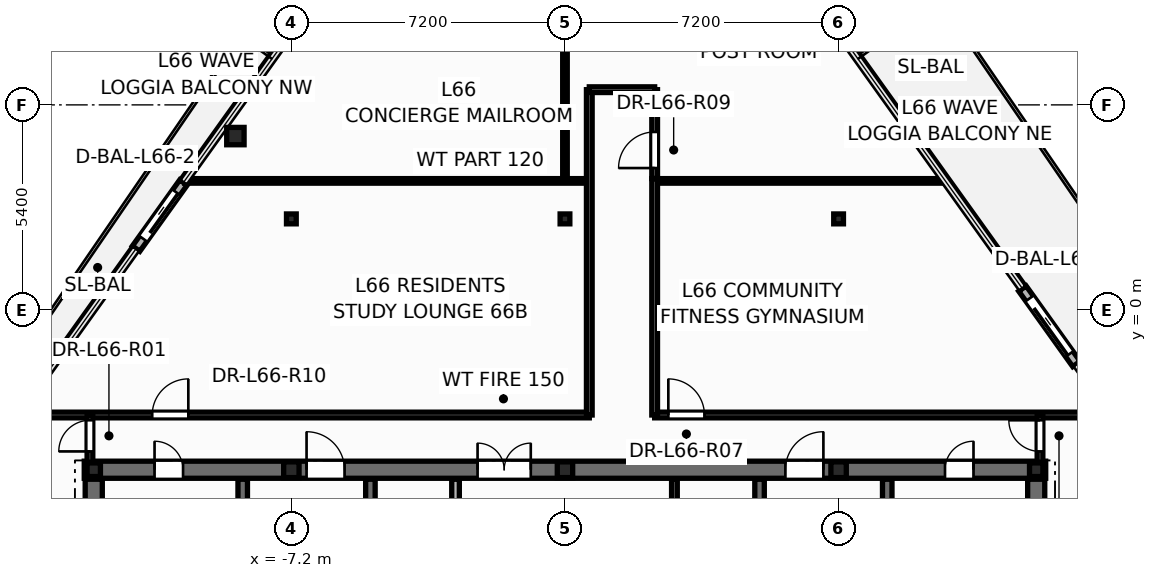
"""IFC4 building model, lengths in metres.
Left out: names, types, materials, properties, quantities, classifications, styles, units other than length and angle.
Written with IfcOpenShell. Run it as: python <this file> out.ifc"""

import sys

from ifc_helpers import new_model, si_unit, direction, frame, frame_2d, origin, origin_2d, place, context, subcontext, project, spatial, rectangle, hollow_circle, i_section, extrude, element, fill, save


model = new_model("IFC4")
c1 = context("Model", 3, precision=1e-05, world=origin(), true_north=direction((0.0, 1.0)))
c2 = subcontext(c1, "Body", "Model", "MODEL_VIEW")
j1 = project(units=[si_unit("LENGTHUNIT", "METRE"), si_unit("PLANEANGLEUNIT", "RADIAN")], contexts=[c1])
p1 = place(None, origin())
s1 = spatial("IfcSite", under=j1, at=p1, CompositionType="ELEMENT")
p2 = place(p1, origin())
s2 = spatial("IfcBuilding", under=s1, at=p2, CompositionType="ELEMENT")
p3 = place(p2, frame((0.0, 0.0, 252.6)))
s3 = spatial("IfcBuildingStorey", under=s2, at=p3, CompositionType="ELEMENT", Elevation=252.6)
for number, where, z_axis, x_axis in (
    (1, (8.673, 4.579, 0.0), (0.0, 0.0, 1.0), (1.0, 0.0, 0.0)),
    (2, (-8.673, 4.579, 0.0), (0.0, 0.0, 1.0), (1.0, 0.0, 0.0)),
):
    element("IfcColumn", number, at=place(p3, frame(where, z_axis=z_axis, x_axis=x_axis)), inside=s3, PredefinedType="COLUMN", context=c2, shape_type="SweptSolid", body=[
        extrude(hollow_circle(Radius=0.229, WallThickness=0.016, at=origin_2d()), origin(), (0.0, 0.0, 1.0), 3.6),
    ])
for number, where, z_axis, x_axis in (
    (3, (12.4, -4.2, 0.0), (0.0, 0.0, 1.0), (1.0, 0.0, 0.0)),
    (4, (-12.4, -4.2, 0.0), (0.0, 0.0, 1.0), (1.0, 0.0, 0.0)),
):
    element("IfcColumn", number, at=place(p3, frame(where, z_axis=z_axis, x_axis=x_axis)), inside=s3, PredefinedType="COLUMN", context=c2, shape_type="SweptSolid", body=[
        extrude(i_section(OverallWidth=0.352, OverallDepth=0.359, WebThickness=0.018, FlangeThickness=0.026, at=origin_2d()), origin(), (0.0, 0.0, 1.0), 3.6),
    ])
for number, where, z_axis, x_axis in (
    (5, (-7.2, -4.2, 0.0), (0.0, 0.0, 1.0), (1.0, 0.0, 0.0)),
    (6, (0.0, -4.2, 0.0), (0.0, 0.0, 1.0), (1.0, 0.0, 0.0)),
    (7, (7.2, -4.2, 0.0), (0.0, 0.0, 1.0), (1.0, 0.0, 0.0)),
):
    element("IfcColumn", number, at=place(p3, frame(where, z_axis=z_axis, x_axis=x_axis)), inside=s3, PredefinedType="PILASTER", context=c2, shape_type="SweptSolid", body=[
        extrude(i_section(OverallWidth=0.405, OverallDepth=0.414, WebThickness=0.022, FlangeThickness=0.032, at=origin_2d()), origin(), (0.0, 0.0, 1.0), 3.6),
    ])
for number, where, z_axis, x_axis in (
    (8, (-7.2, 2.4, 0.0), (0.0, 0.0, 1.0), (1.0, 0.0, 0.0)),
    (9, (0.0, 2.4, 0.0), (0.0, 0.0, 1.0), (1.0, 0.0, 0.0)),
    (10, (7.2, 2.4, 0.0), (0.0, 0.0, 1.0), (1.0, 0.0, 0.0)),
):
    element("IfcColumn", number, at=place(p3, frame(where, z_axis=z_axis, x_axis=x_axis)), inside=s3, PredefinedType="COLUMN", context=c2, shape_type="SweptSolid", body=[
        extrude(i_section(OverallWidth=0.256, OverallDepth=0.26, WebThickness=0.01, FlangeThickness=0.017, at=origin_2d()), origin(), (0.0, 0.0, 1.0), 3.6),
    ])
p4 = place(p3, frame((13.458, -1.417, -0.015), z_axis=(0.0, 0.0, 1.0), x_axis=(-0.582146480264, 0.813083928949, 0.0)))
e11 = element("IfcWall", 11, at=p4, inside=s3, PredefinedType="STANDARD", context=c2, shape_type="SweptSolid", body=[
    extrude(rectangle(XDim=2.44, YDim=0.24, at=frame_2d((1.22, 0.0))), origin(), (0.0, 0.0, 1.0), 2.878),
])
p5 = place(p4, frame((0.32, 0.0, 0.015)))
e12 = element("IfcOpeningElement", 12, at=p5, cuts=e11, PredefinedType="OPENING", context=c2, shape_type="SweptSolid", body=[
    extrude(rectangle(XDim=1.806, YDim=2.204, at=frame_2d((0.9, 1.102))), frame((0.0, 0.13, 0.0), z_axis=(0.0, -1.0, 0.0), x_axis=(1.0, 0.0, 0.0)), (0.0, 0.0, 1.0), 0.26),
])
p6 = place(p3, frame((-10.039, 3.357, -0.015), z_axis=(0.0, 0.0, 1.0), x_axis=(-0.58216589686, -0.813070026832, 0.0)))
e13 = element("IfcWall", 13, at=p6, inside=s3, PredefinedType="STANDARD", context=c2, shape_type="SweptSolid", body=[
    extrude(rectangle(XDim=2.14, YDim=0.24, at=frame_2d((1.07, 0.0))), origin(), (0.0, 0.0, 1.0), 2.878),
])
p7 = place(p6, frame((0.32, 0.0, 0.015)))
e14 = element("IfcOpeningElement", 14, at=p7, cuts=e13, PredefinedType="OPENING", context=c2, shape_type="SweptSolid", body=[
    extrude(rectangle(XDim=1.506, YDim=2.204, at=frame_2d((0.75, 1.102))), frame((0.0, 0.13, 0.0), z_axis=(0.0, -1.0, 0.0), x_axis=(1.0, 0.0, 0.0)), (0.0, 0.0, 1.0), 0.26),
])
p8 = place(p3, frame((2.88, -5.6, 0.0), z_axis=(0.0, 0.0, 1.0), x_axis=(0.0, 1.0, 0.0)))
e15 = element("IfcWall", 15, at=p8, inside=s3, PredefinedType="PARTITIONING", context=c2, shape_type="SweptSolid", body=[
    extrude(rectangle(XDim=1.15, YDim=0.15, at=frame_2d((0.575, 0.0))), origin(), (0.0, 0.0, 1.0), 3.345),
])
p9 = place(p3, frame((-12.65, -4.2, 0.0), z_axis=(0.0, 0.0, 1.0), x_axis=(1.0, 0.0, 0.0)))
e16 = element("IfcWall", 16, at=p9, inside=s3, PredefinedType="SHEAR", context=c2, shape_type="SweptSolid", body=[
    extrude(rectangle(XDim=25.3, YDim=0.45, at=frame_2d((12.65, 0.0))), origin(), (0.0, 0.0, 1.0), 3.6),
])
p10 = place(p9, frame((1.85, 0.0, 0.0)))
e17 = element("IfcOpeningElement", 17, at=p10, cuts=e16, PredefinedType="OPENING", context=c2, shape_type="SweptSolid", body=[
    extrude(rectangle(XDim=0.756, YDim=2.054, at=frame_2d((0.375, 1.027))), frame((0.0, 0.235, 0.0), z_axis=(0.0, -1.0, 0.0), x_axis=(1.0, 0.0, 0.0)), (0.0, 0.0, 1.0), 0.47),
])
p11 = place(p9, frame((22.65, 0.0, 0.0)))
e18 = element("IfcOpeningElement", 18, at=p11, cuts=e16, PredefinedType="OPENING", context=c2, shape_type="SweptSolid", body=[
    extrude(rectangle(XDim=0.756, YDim=2.054, at=frame_2d((0.375, 1.027))), frame((0.0, 0.235, 0.0), z_axis=(0.0, -1.0, 0.0), x_axis=(1.0, 0.0, 0.0)), (0.0, 0.0, 1.0), 0.47),
])
p12 = place(p9, frame((5.85, 0.0, 0.0)))
e19 = element("IfcOpeningElement", 19, at=p12, cuts=e16, PredefinedType="OPENING", context=c2, shape_type="SweptSolid", body=[
    extrude(rectangle(XDim=1.006, YDim=2.104, at=frame_2d((0.5, 1.052))), frame((0.0, 0.235, 0.0), z_axis=(0.0, -1.0, 0.0), x_axis=(1.0, 0.0, 0.0)), (0.0, 0.0, 1.0), 0.47),
])
p13 = place(p9, frame((10.35, 0.0, 0.0)))
e20 = element("IfcOpeningElement", 20, at=p13, cuts=e16, PredefinedType="OPENING", context=c2, shape_type="SweptSolid", body=[
    extrude(rectangle(XDim=1.406, YDim=2.154, at=frame_2d((0.7, 1.077))), frame((0.0, 0.235, 0.0), z_axis=(0.0, -1.0, 0.0), x_axis=(1.0, 0.0, 0.0)), (0.0, 0.0, 1.0), 0.47),
])
p14 = place(p9, frame((18.45, 0.0, 0.0)))
e21 = element("IfcOpeningElement", 21, at=p14, cuts=e16, PredefinedType="OPENING", context=c2, shape_type="SweptSolid", body=[
    extrude(rectangle(XDim=1.006, YDim=2.104, at=frame_2d((0.5, 1.052))), frame((0.0, 0.235, 0.0), z_axis=(0.0, -1.0, 0.0), x_axis=(1.0, 0.0, 0.0)), (0.0, 0.0, 1.0), 0.47),
])
p15 = place(p3, frame((-8.48, -13.85, 0.0), z_axis=(0.0, 0.0, 1.0), x_axis=(0.0, 1.0, 0.0)))
e22 = element("IfcWall", 22, at=p15, inside=s3, PredefinedType="SHEAR", context=c2, shape_type="SweptSolid", body=[
    extrude(rectangle(XDim=9.4, YDim=0.25, at=frame_2d((4.7, 0.0))), origin(), (0.0, 0.0, 1.0), 3.6),
])
p16 = place(p15, frame((6.95, 0.0, 0.0)))
e23 = element("IfcOpeningElement", 23, at=p16, cuts=e22, PredefinedType="OPENING", context=c2, shape_type="SweptSolid", body=[
    extrude(rectangle(XDim=1.006, YDim=2.104, at=frame_2d((0.5, 1.052))), frame((0.0, 0.135, 0.0), z_axis=(0.0, -1.0, 0.0), x_axis=(1.0, 0.0, 0.0)), (0.0, 0.0, 1.0), 0.27),
])
p17 = place(p3, frame((8.48, -13.85, 0.0), z_axis=(0.0, 0.0, 1.0), x_axis=(0.0, 1.0, 0.0)))
e24 = element("IfcWall", 24, at=p17, inside=s3, PredefinedType="SHEAR", context=c2, shape_type="SweptSolid", body=[
    extrude(rectangle(XDim=9.4, YDim=0.25, at=frame_2d((4.7, 0.0))), origin(), (0.0, 0.0, 1.0), 3.6),
])
p18 = place(p17, frame((6.95, 0.0, 0.0)))
e25 = element("IfcOpeningElement", 25, at=p18, cuts=e24, PredefinedType="OPENING", context=c2, shape_type="SweptSolid", body=[
    extrude(rectangle(XDim=1.006, YDim=2.104, at=frame_2d((0.5, 1.052))), frame((0.0, 0.135, 0.0), z_axis=(0.0, -1.0, 0.0), x_axis=(1.0, 0.0, 0.0)), (0.0, 0.0, 1.0), 0.27),
])
for number, where, z_axis, x_axis in (
    (26, (-5.12, -13.85, 0.0), (0.0, 0.0, 1.0), (0.0, 1.0, 0.0)),
    (27, (5.12, -13.85, 0.0), (0.0, 0.0, 1.0), (0.0, 1.0, 0.0)),
):
    element("IfcWall", number, at=place(p3, frame(where, z_axis=z_axis, x_axis=x_axis)), inside=s3, PredefinedType="SHEAR", context=c2, shape_type="SweptSolid", body=[
        extrude(rectangle(XDim=9.4, YDim=0.25, at=frame_2d((4.7, 0.0))), origin(), (0.0, 0.0, 1.0), 3.6),
    ])
for number, where, z_axis, x_axis in (
    (28, (-12.4, -13.85, 0.0), (0.0, 0.0, 1.0), (0.0, 1.0, 0.0)),
    (29, (12.4, -13.85, 0.0), (0.0, 0.0, 1.0), (0.0, 1.0, 0.0)),
):
    element("IfcWall", number, at=place(p3, frame(where, z_axis=z_axis, x_axis=x_axis)), inside=s3, PredefinedType="SHEAR", context=c2, shape_type="SweptSolid", body=[
        extrude(rectangle(XDim=9.4, YDim=0.45, at=frame_2d((4.7, 0.0))), origin(), (0.0, 0.0, 1.0), 3.6),
    ])
p19 = place(p3, frame((-2.88, -9.45, 0.0), z_axis=(0.0, 0.0, 1.0), x_axis=(0.0, 1.0, 0.0)))
e30 = element("IfcWall", 30, at=p19, inside=s3, PredefinedType="SOLIDWALL", context=c2, shape_type="SweptSolid", body=[
    extrude(rectangle(XDim=5.0, YDim=0.2, at=frame_2d((2.5, 0.0))), origin(), (0.0, 0.0, 1.0), 3.345),
])
p20 = place(p19, frame((2.05, 0.0, 0.0)))
e31 = element("IfcOpeningElement", 31, at=p20, cuts=e30, PredefinedType="OPENING", context=c2, shape_type="SweptSolid", body=[
    extrude(rectangle(XDim=0.926, YDim=2.104, at=frame_2d((0.46, 1.052))), frame((0.0, 0.11, 0.0), z_axis=(0.0, -1.0, 0.0), x_axis=(1.0, 0.0, 0.0)), (0.0, 0.0, 1.0), 0.22),
])
p21 = place(p3, frame((-14.42, -2.76, 0.0), z_axis=(0.0, 0.0, 1.0), x_axis=(1.0, 0.0, 0.0)))
e32 = element("IfcWall", 32, at=p21, inside=s3, PredefinedType="PARTITIONING", context=c2, shape_type="SweptSolid", body=[
    extrude(rectangle(XDim=15.06, YDim=0.15, at=frame_2d((7.53, 0.0))), origin(), (0.0, 0.0, 1.0), 2.32),
])
p22 = place(p21, frame((3.559, 0.0, 0.0)))
e33 = element("IfcOpeningElement", 33, at=p22, cuts=e32, PredefinedType="OPENING", context=c2, shape_type="SweptSolid", body=[
    extrude(rectangle(XDim=0.956, YDim=2.104, at=frame_2d((0.475, 1.052))), frame((0.0, 0.085, 0.0), z_axis=(0.0, -1.0, 0.0), x_axis=(1.0, 0.0, 0.0)), (0.0, 0.0, 1.0), 0.17),
])
p23 = place(p3, frame((2.36, -2.76, 0.0), z_axis=(0.0, 0.0, 1.0), x_axis=(1.0, 0.0, 0.0)))
e34 = element("IfcWall", 34, at=p23, inside=s3, PredefinedType="PARTITIONING", context=c2, shape_type="SweptSolid", body=[
    extrude(rectangle(XDim=12.06, YDim=0.15, at=frame_2d((6.03, 0.0))), origin(), (0.0, 0.0, 1.0), 2.32),
])
p24 = place(p23, frame((0.36, 0.0, 0.0)))
e35 = element("IfcOpeningElement", 35, at=p24, cuts=e34, PredefinedType="OPENING", context=c2, shape_type="SweptSolid", body=[
    extrude(rectangle(XDim=0.956, YDim=2.104, at=frame_2d((0.475, 1.052))), frame((0.0, 0.085, 0.0), z_axis=(0.0, -1.0, 0.0), x_axis=(1.0, 0.0, 0.0)), (0.0, 0.0, 1.0), 0.17),
])
p25 = place(p3, frame((0.0, 3.4, 0.0), z_axis=(0.0, 0.0, 1.0), x_axis=(0.0, 1.0, 0.0)))
e36 = element("IfcWall", 36, at=p25, inside=s3, PredefinedType="PARTITIONING", context=c2, shape_type="SweptSolid", body=[
    extrude(rectangle(XDim=10.537, YDim=0.12, at=frame_2d((5.269, 0.0))), origin(), (0.0, 0.0, 1.0), 2.32),
])
p26 = place(p25, frame((6.958, 0.0, 0.0)))
e37 = element("IfcOpeningElement", 37, at=p26, cuts=e36, PredefinedType="OPENING", context=c2, shape_type="SweptSolid", body=[
    extrude(rectangle(XDim=0.926, YDim=2.104, at=frame_2d((0.46, 1.052))), frame((0.0, 0.07, 0.0), z_axis=(0.0, -1.0, 0.0), x_axis=(1.0, 0.0, 0.0)), (0.0, 0.0, 1.0), 0.14),
])
p27 = place(p3, frame((-10.009, 3.4, 0.0), z_axis=(0.0, 0.0, 1.0), x_axis=(1.0, 0.0, 0.0)))
e38 = element("IfcWall", 38, at=p27, inside=s3, PredefinedType="PARTITIONING", context=c2, shape_type="SweptSolid", body=[
    extrude(rectangle(XDim=10.649, YDim=0.12, at=frame_2d((5.324, 0.0))), origin(), (0.0, 0.0, 1.0), 2.32),
])
p28 = place(p3, frame((2.36, 3.4, 0.0), z_axis=(0.0, 0.0, 1.0), x_axis=(1.0, 0.0, 0.0)))
e39 = element("IfcWall", 39, at=p28, inside=s3, PredefinedType="PARTITIONING", context=c2, shape_type="SweptSolid", body=[
    extrude(rectangle(XDim=7.649, YDim=0.12, at=frame_2d((3.824, 0.0))), origin(), (0.0, 0.0, 1.0), 2.718),
])
p29 = place(p3, frame((2.36, -2.76, 0.0), z_axis=(0.0, 0.0, 1.0), x_axis=(0.0, 1.0, 0.0)))
e40 = element("IfcWall", 40, at=p29, inside=s3, PredefinedType="PARTITIONING", context=c2, shape_type="SweptSolid", body=[
    extrude(rectangle(XDim=6.22, YDim=0.15, at=frame_2d((3.11, 0.0))), origin(), (0.0, 0.0, 1.0), 2.32),
])
p30 = place(p3, frame((0.64, -2.76, 0.0), z_axis=(0.0, 0.0, 1.0), x_axis=(0.0, 1.0, 0.0)))
e41 = element("IfcWall", 41, at=p30, inside=s3, PredefinedType="PARTITIONING", context=c2, shape_type="SweptSolid", body=[
    extrude(rectangle(XDim=8.56, YDim=0.15, at=frame_2d((4.28, 0.0))), origin(), (0.0, 0.0, 1.0), 2.32),
])
p31 = place(p3, frame((2.36, 3.462, 0.0), z_axis=(0.0, 0.0, 1.0), x_axis=(0.0, 1.0, 0.0)))
e42 = element("IfcWall", 42, at=p31, inside=s3, PredefinedType="PARTITIONING", context=c2, shape_type="SweptSolid", body=[
    extrude(rectangle(XDim=2.338, YDim=0.15, at=frame_2d((1.169, 0.0))), origin(), (0.0, 0.0, 1.0), 2.964),
])
p32 = place(p31, frame((0.276, 0.0, 0.0)))
e43 = element("IfcOpeningElement", 43, at=p32, cuts=e42, PredefinedType="OPENING", context=c2, shape_type="SweptSolid", body=[
    extrude(rectangle(XDim=0.956, YDim=2.104, at=frame_2d((0.475, 1.052))), frame((0.0, 0.085, 0.0), z_axis=(0.0, -1.0, 0.0), x_axis=(1.0, 0.0, 0.0)), (0.0, 0.0, 1.0), 0.17),
])
p33 = place(p3, frame((0.64, 5.8, 0.0), z_axis=(0.0, 0.0, 1.0), x_axis=(1.0, 0.0, 0.0)))
e44 = element("IfcWall", 44, at=p33, inside=s3, PredefinedType="PARTITIONING", context=c2, shape_type="SweptSolid", body=[
    extrude(rectangle(XDim=1.72, YDim=0.15, at=frame_2d((0.86, 0.0))), origin(), (0.0, 0.0, 1.0), 2.964),
])
p34 = place(p3, frame((-12.5, -4.24, 0.0), z_axis=(0.0, 0.0, 1.0), x_axis=(0.0, 1.0, 0.0)))
e45 = element("IfcWall", 45, at=p34, inside=s3, PredefinedType="PARTITIONING", context=c2, shape_type="SweptSolid", body=[
    extrude(rectangle(XDim=1.48, YDim=0.15, at=frame_2d((0.74, 0.0))), origin(), (0.0, 0.0, 1.0), 2.32),
])
p35 = place(p34, frame((0.522, 0.0, 0.0)))
e46 = element("IfcOpeningElement", 46, at=p35, cuts=e45, PredefinedType="OPENING", context=c2, shape_type="SweptSolid", body=[
    extrude(rectangle(XDim=0.826, YDim=2.104, at=frame_2d((0.41, 1.052))), frame((0.0, 0.085, 0.0), z_axis=(0.0, -1.0, 0.0), x_axis=(1.0, 0.0, 0.0)), (0.0, 0.0, 1.0), 0.17),
])
p36 = place(p3, frame((12.5, -4.24, 0.0), z_axis=(0.0, 0.0, 1.0), x_axis=(0.0, 1.0, 0.0)))
e47 = element("IfcWall", 47, at=p36, inside=s3, PredefinedType="PARTITIONING", context=c2, shape_type="SweptSolid", body=[
    extrude(rectangle(XDim=1.48, YDim=0.15, at=frame_2d((0.74, 0.0))), origin(), (0.0, 0.0, 1.0), 2.32),
])
p37 = place(p36, frame((0.522, 0.0, 0.0)))
e48 = element("IfcOpeningElement", 48, at=p37, cuts=e47, PredefinedType="OPENING", context=c2, shape_type="SweptSolid", body=[
    extrude(rectangle(XDim=0.826, YDim=2.104, at=frame_2d((0.41, 1.052))), frame((0.0, 0.085, 0.0), z_axis=(0.0, -1.0, 0.0), x_axis=(1.0, 0.0, 0.0)), (0.0, 0.0, 1.0), 0.17),
])
p38 = place(p5, origin())
e49 = element("IfcDoor", 49, at=p38, inside=s3, OperationType="SLIDING_TO_LEFT", PredefinedType="DOOR", context=c2, shape_type="SweptSolid", body=[
    extrude(rectangle(XDim=1.8, YDim=2.2, at=frame_2d((0.9, 1.1))), frame((0.0, 0.025, 0.0), z_axis=(0.0, -1.0, 0.0), x_axis=(1.0, 0.0, 0.0)), (0.0, 0.0, 1.0), 0.05),
])
fill(e12, e49)
p39 = place(p7, origin())
e50 = element("IfcDoor", 50, at=p39, inside=s3, OperationType="SLIDING_TO_RIGHT", PredefinedType="DOOR", context=c2, shape_type="SweptSolid", body=[
    extrude(rectangle(XDim=1.5, YDim=2.2, at=frame_2d((0.75, 1.1))), frame((0.0, 0.025, 0.0), z_axis=(0.0, -1.0, 0.0), x_axis=(1.0, 0.0, 0.0)), (0.0, 0.0, 1.0), 0.05),
])
fill(e14, e50)
p40 = place(p10, origin())
e51 = element("IfcDoor", 51, at=p40, inside=s3, OperationType="SINGLE_SWING_LEFT", PredefinedType="DOOR", context=c2, shape_type="SweptSolid", body=[
    extrude(rectangle(XDim=0.75, YDim=2.05, at=frame_2d((0.375, 1.025))), frame((0.0, 0.025, 0.0), z_axis=(0.0, -1.0, 0.0), x_axis=(1.0, 0.0, 0.0)), (0.0, 0.0, 1.0), 0.05),
])
fill(e17, e51)
p41 = place(p11, origin())
e52 = element("IfcDoor", 52, at=p41, inside=s3, OperationType="SINGLE_SWING_RIGHT", PredefinedType="DOOR", context=c2, shape_type="SweptSolid", body=[
    extrude(rectangle(XDim=0.75, YDim=2.05, at=frame_2d((0.375, 1.025))), frame((0.0, 0.025, 0.0), z_axis=(0.0, -1.0, 0.0), x_axis=(1.0, 0.0, 0.0)), (0.0, 0.0, 1.0), 0.05),
])
fill(e18, e52)
p42 = place(p12, origin())
e53 = element("IfcDoor", 53, at=p42, inside=s3, OperationType="SINGLE_SWING_LEFT", PredefinedType="DOOR", context=c2, shape_type="SweptSolid", body=[
    extrude(rectangle(XDim=1.0, YDim=2.1, at=frame_2d((0.5, 1.05))), frame((0.0, 0.025, 0.0), z_axis=(0.0, -1.0, 0.0), x_axis=(1.0, 0.0, 0.0)), (0.0, 0.0, 1.0), 0.05),
])
fill(e19, e53)
p43 = place(p13, origin())
e54 = element("IfcDoor", 54, at=p43, inside=s3, OperationType="DOUBLE_DOOR_SINGLE_SWING", PredefinedType="DOOR", context=c2, shape_type="SweptSolid", body=[
    extrude(rectangle(XDim=1.4, YDim=2.15, at=frame_2d((0.7, 1.075))), frame((0.0, 0.025, 0.0), z_axis=(0.0, -1.0, 0.0), x_axis=(1.0, 0.0, 0.0)), (0.0, 0.0, 1.0), 0.05),
])
fill(e20, e54)
p44 = place(p14, origin())
e55 = element("IfcDoor", 55, at=p44, inside=s3, OperationType="SINGLE_SWING_RIGHT", PredefinedType="DOOR", context=c2, shape_type="SweptSolid", body=[
    extrude(rectangle(XDim=1.0, YDim=2.1, at=frame_2d((0.5, 1.05))), frame((0.0, 0.025, 0.0), z_axis=(0.0, -1.0, 0.0), x_axis=(1.0, 0.0, 0.0)), (0.0, 0.0, 1.0), 0.05),
])
fill(e21, e55)
p45 = place(p35, origin())
e56 = element("IfcDoor", 56, at=p45, inside=s3, OperationType="SINGLE_SWING_LEFT", PredefinedType="DOOR", context=c2, shape_type="SweptSolid", body=[
    extrude(rectangle(XDim=0.82, YDim=2.1, at=frame_2d((0.41, 1.05))), frame((0.0, 0.025, 0.0), z_axis=(0.0, -1.0, 0.0), x_axis=(1.0, 0.0, 0.0)), (0.0, 0.0, 1.0), 0.05),
])
fill(e46, e56)
p46 = place(p37, origin())
e57 = element("IfcDoor", 57, at=p46, inside=s3, OperationType="SINGLE_SWING_RIGHT", PredefinedType="DOOR", context=c2, shape_type="SweptSolid", body=[
    extrude(rectangle(XDim=0.82, YDim=2.1, at=frame_2d((0.41, 1.05))), frame((0.0, 0.025, 0.0), z_axis=(0.0, -1.0, 0.0), x_axis=(1.0, 0.0, 0.0)), (0.0, 0.0, 1.0), 0.05),
])
fill(e48, e57)
p47 = place(p24, origin())
e58 = element("IfcDoor", 58, at=p47, inside=s3, OperationType="SINGLE_SWING_LEFT", PredefinedType="DOOR", context=c2, shape_type="SweptSolid", body=[
    extrude(rectangle(XDim=0.95, YDim=2.1, at=frame_2d((0.475, 1.05))), frame((0.0, 0.025, 0.0), z_axis=(0.0, -1.0, 0.0), x_axis=(1.0, 0.0, 0.0)), (0.0, 0.0, 1.0), 0.05),
])
fill(e35, e58)
p48 = place(p32, origin())
e59 = element("IfcDoor", 59, at=p48, inside=s3, OperationType="SINGLE_SWING_LEFT", PredefinedType="DOOR", context=c2, shape_type="SweptSolid", body=[
    extrude(rectangle(XDim=0.95, YDim=2.1, at=frame_2d((0.475, 1.05))), frame((0.0, 0.025, 0.0), z_axis=(0.0, -1.0, 0.0), x_axis=(1.0, 0.0, 0.0)), (0.0, 0.0, 1.0), 0.05),
])
fill(e43, e59)
p49 = place(p22, origin())
e60 = element("IfcDoor", 60, at=p49, inside=s3, OperationType="SINGLE_SWING_RIGHT", PredefinedType="DOOR", context=c2, shape_type="SweptSolid", body=[
    extrude(rectangle(XDim=0.95, YDim=2.1, at=frame_2d((0.475, 1.05))), frame((0.0, 0.025, 0.0), z_axis=(0.0, -1.0, 0.0), x_axis=(1.0, 0.0, 0.0)), (0.0, 0.0, 1.0), 0.05),
])
fill(e33, e60)
save(model, sys.argv[1])
